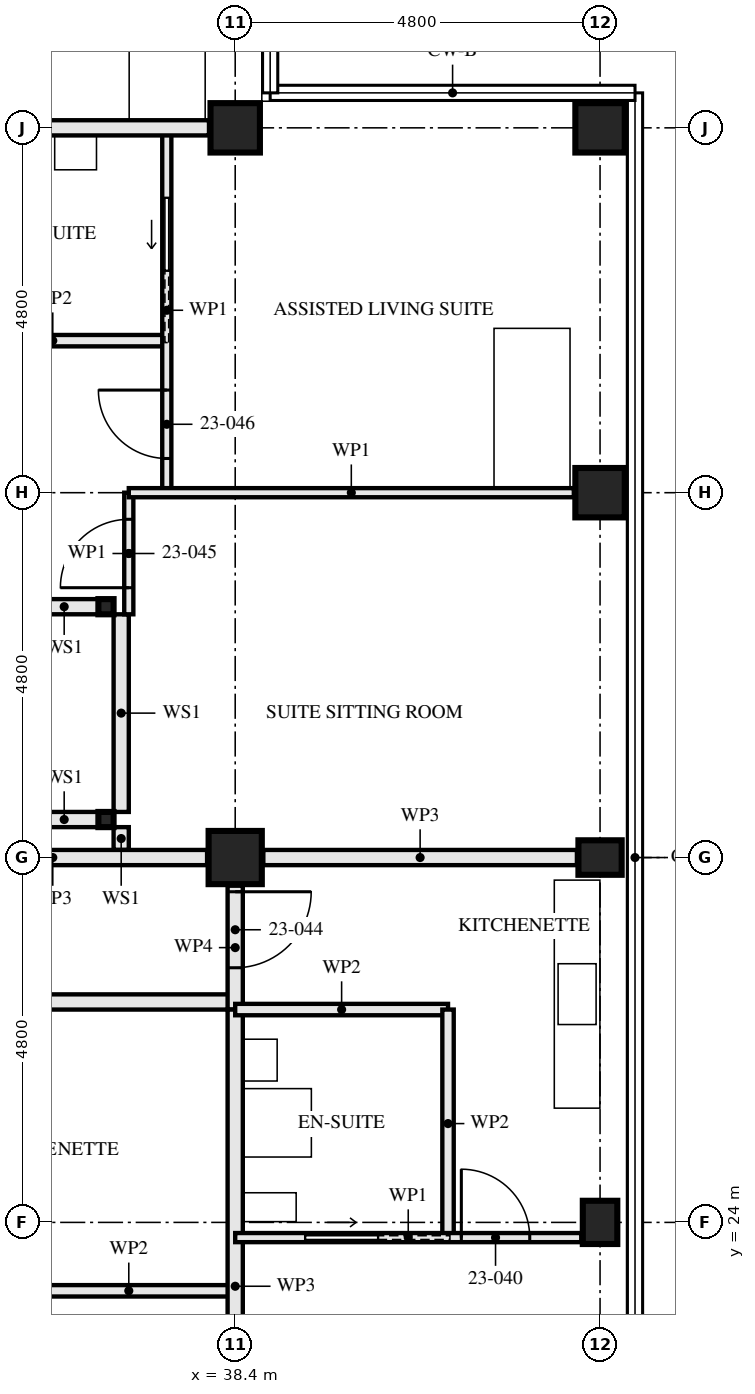
"""IFC4 building model, lengths in metres.
Left out: names, types, materials, properties, quantities, classifications, styles, units other than length and angle.
Written with IfcOpenShell. Run it as: python <this file> out.ifc"""

import sys

from ifc_helpers import new_model, si_unit, direction, frame, frame_2d, origin, origin_2d, place, context, subcontext, project, spatial, rectangle, hollow_rectangle, i_section, extrude, element, fill, save


model = new_model("IFC4")
c1 = context("Model", 3, precision=1e-05, world=origin(), true_north=direction((0.0, 1.0)))
c2 = subcontext(c1, "Body", "Model", "MODEL_VIEW")
j1 = project(units=[si_unit("LENGTHUNIT", "METRE"), si_unit("PLANEANGLEUNIT", "RADIAN")], contexts=[c1])
p1 = place(None, origin())
s1 = spatial("IfcSite", under=j1, at=p1, CompositionType="ELEMENT")
p2 = place(p1, origin())
s2 = spatial("IfcBuilding", under=s1, at=p2, CompositionType="ELEMENT")
p3 = place(p2, frame((0.0, 0.0, 87.5)))
s3 = spatial("IfcBuildingStorey", under=s2, at=p3, CompositionType="ELEMENT", Elevation=87.5)
p4 = place(p3, frame((38.4, 28.8, 0.0), z_axis=(0.0, 0.0, 1.0), x_axis=(0.0, 1.0, 0.0)))
e1 = element("IfcColumn", 1, at=p4, inside=s3, PredefinedType="COLUMN", context=c2, shape_type="SweptSolid", body=[
    extrude(hollow_rectangle(XDim=0.7, YDim=0.7, WallThickness=0.06, at=origin_2d()), origin(), (0.0, 0.0, 1.0), 3.5),
])
p5 = place(p3, frame((38.4, 38.4, 0.0), z_axis=(0.0, 0.0, 1.0), x_axis=(0.0, 1.0, 0.0)))
e2 = element("IfcColumn", 2, at=p5, inside=s3, PredefinedType="COLUMN", context=c2, shape_type="SweptSolid", body=[
    extrude(hollow_rectangle(XDim=0.65, YDim=0.65, WallThickness=0.08, at=origin_2d()), origin(), (0.0, 0.0, 1.0), 3.5),
])
for number, where, z_axis, x_axis in (
    (3, (43.2, 24.0, 0.0), (0.0, 0.0, 1.0), (1.0, 0.0, 0.0)),
    (4, (43.2, 28.8, 0.0), (0.0, 0.0, 1.0), (0.0, 1.0, 0.0)),
):
    element("IfcColumn", number, at=place(p3, frame(where, z_axis=z_axis, x_axis=x_axis)), inside=s3, PredefinedType="COLUMN", context=c2, shape_type="SweptSolid", body=[
        extrude(i_section(OverallWidth=0.454, OverallDepth=0.569, WebThickness=0.078, FlangeThickness=0.125, FilletRadius=0.015, at=origin_2d()), origin(), (0.0, 0.0, 1.0), 3.5),
    ])
for number, where, z_axis, x_axis in (
    (5, (43.2, 33.6, 0.0), (0.0, 0.0, 1.0), (1.0, 0.0, 0.0)),
    (6, (43.2, 38.4, 0.0), (0.0, 0.0, 1.0), (0.0, 1.0, 0.0)),
):
    element("IfcColumn", number, at=place(p3, frame(where, z_axis=z_axis, x_axis=x_axis)), inside=s3, PredefinedType="COLUMN", context=c2, shape_type="SweptSolid", body=[
        extrude(hollow_rectangle(XDim=0.65, YDim=0.65, WallThickness=0.08, at=origin_2d()), origin(), (0.0, 0.0, 1.0), 3.5),
    ])
for number, where, z_axis, x_axis in (
    (7, (36.7, 29.3, 0.0), (0.0, 0.0, 1.0), (1.0, 0.0, 0.0)),
    (8, (36.7, 32.1, 0.0), (0.0, 0.0, 1.0), (1.0, 0.0, 0.0)),
):
    element("IfcColumn", number, at=place(p3, frame(where, z_axis=z_axis, x_axis=x_axis)), inside=s3, PredefinedType="COLUMN", context=c2, shape_type="SweptSolid", body=[
        extrude(hollow_rectangle(XDim=0.2, YDim=0.2, WallThickness=0.008, at=origin_2d()), origin(), (0.0, 0.0, 1.0), 3.33),
    ])
p6 = place(p3, frame((35.6, 23.1, 0.0), z_axis=(0.0, 0.0, 1.0), x_axis=(1.0, 0.0, 0.0)))
e9 = element("IfcWall", 9, at=p6, inside=s3, PredefinedType="PARTITIONING", context=c2, shape_type="SweptSolid", body=[
    extrude(rectangle(XDim=2.8, YDim=0.15, at=frame_2d((1.4, 0.0))), origin(), (0.0, 0.0, 1.0), 3.33),
])
p7 = place(p3, frame((38.4, 19.52, 0.0), z_axis=(0.0, 0.0, 1.0), x_axis=(0.0, 1.0, 0.0)))
e10 = element("IfcWall", 10, at=p7, inside=s3, PredefinedType="PARTITIONING", context=c2, shape_type="SweptSolid", body=[
    extrude(rectangle(XDim=7.28, YDim=0.2, at=frame_2d((3.64, 0.0))), origin(), (0.0, 0.0, 1.0), 2.55),
])
p8 = place(p3, frame((41.2, 23.8, 0.0), z_axis=(0.0, 0.0, 1.0), x_axis=(0.0, 1.0, 0.0)))
e11 = element("IfcWall", 11, at=p8, inside=s3, PredefinedType="PARTITIONING", context=c2, shape_type="SweptSolid", body=[
    extrude(rectangle(XDim=3.0, YDim=0.15, at=frame_2d((1.5, 0.0))), origin(), (0.0, 0.0, 1.0), 2.55),
])
p9 = place(p3, frame((38.4, 26.8, 0.0), z_axis=(0.0, 0.0, 1.0), x_axis=(1.0, 0.0, 0.0)))
e12 = element("IfcWall", 12, at=p9, inside=s3, PredefinedType="PARTITIONING", context=c2, shape_type="SweptSolid", body=[
    extrude(rectangle(XDim=2.8, YDim=0.15, at=frame_2d((1.4, 0.0))), origin(), (0.0, 0.0, 1.0), 3.33),
])
p10 = place(p3, frame((38.4, 23.8, 0.0), z_axis=(0.0, 0.0, 1.0), x_axis=(1.0, 0.0, 0.0)))
e13 = element("IfcWall", 13, at=p10, inside=s3, PredefinedType="PARTITIONING", context=c2, shape_type="SweptSolid", body=[
    extrude(rectangle(XDim=4.553, YDim=0.12, at=frame_2d((2.276, 0.0))), origin(), (0.0, 0.0, 1.0), 3.33),
])
p11 = place(p10, frame((2.975, 0.0, 0.0)))
e14 = element("IfcOpeningElement", 14, at=p11, cuts=e13, PredefinedType="OPENING", context=c2, shape_type="SweptSolid", body=[
    extrude(rectangle(XDim=0.9, YDim=2.1, at=frame_2d((0.45, 1.05))), frame((0.0, 0.071, 0.0), z_axis=(0.0, -1.0, 0.0), x_axis=(1.0, 0.0, 0.0)), (0.0, 0.0, 1.0), 0.141),
])
p12 = place(p10, frame((0.925, 0.0, 0.0)))
e15 = element("IfcOpeningElement", 15, at=p12, cuts=e13, PredefinedType="OPENING", context=c2, shape_type="SweptSolid", body=[
    extrude(rectangle(XDim=0.95, YDim=2.1, at=frame_2d((0.475, 1.05))), frame((0.0, 0.071, 0.0), z_axis=(0.0, -1.0, 0.0), x_axis=(1.0, 0.0, 0.0)), (0.0, 0.0, 1.0), 0.141),
])
p13 = place(p3, frame((28.8, 26.9, 0.0), z_axis=(0.0, 0.0, 1.0), x_axis=(1.0, 0.0, 0.0)))
e16 = element("IfcWall", 16, at=p13, inside=s3, PredefinedType="PARTITIONING", context=c2, shape_type="SweptSolid", body=[
    extrude(rectangle(XDim=9.6, YDim=0.2, at=frame_2d((4.8, 0.0))), origin(), (0.0, 0.0, 1.0), 3.33),
])
p14 = place(p13, frame((0.4, 0.0, 0.0)))
e17 = element("IfcOpeningElement", 17, at=p14, cuts=e16, PredefinedType="OPENING", context=c2, shape_type="SweptSolid", body=[
    extrude(rectangle(XDim=1.0, YDim=2.1, at=frame_2d((0.5, 1.05))), frame((0.0, 0.111, 0.0), z_axis=(0.0, -1.0, 0.0), x_axis=(1.0, 0.0, 0.0)), (0.0, 0.0, 1.0), 0.221),
])
p15 = place(p13, frame((5.2, 0.0, 0.0)))
e18 = element("IfcOpeningElement", 18, at=p15, cuts=e16, PredefinedType="OPENING", context=c2, shape_type="SweptSolid", body=[
    extrude(rectangle(XDim=1.0, YDim=2.1, at=frame_2d((0.5, 1.05))), frame((0.0, 0.111, 0.0), z_axis=(0.0, -1.0, 0.0), x_axis=(1.0, 0.0, 0.0)), (0.0, 0.0, 1.0), 0.221),
])
p16 = place(p3, frame((38.4, 26.8, 0.0), z_axis=(0.0, 0.0, 1.0), x_axis=(0.0, 1.0, 0.0)))
e19 = element("IfcWall", 19, at=p16, inside=s3, PredefinedType="PARTITIONING", context=c2, shape_type="SweptSolid", body=[
    extrude(rectangle(XDim=1.63, YDim=0.2, at=frame_2d((0.815, 0.0))), origin(), (0.0, 0.0, 1.0), 3.33),
])
p17 = place(p16, frame((0.55, 0.0, 0.0)))
e20 = element("IfcOpeningElement", 20, at=p17, cuts=e19, PredefinedType="OPENING", context=c2, shape_type="SweptSolid", body=[
    extrude(rectangle(XDim=1.0, YDim=2.1, at=frame_2d((0.5, 1.05))), frame((0.0, 0.111, 0.0), z_axis=(0.0, -1.0, 0.0), x_axis=(1.0, 0.0, 0.0)), (0.0, 0.0, 1.0), 0.221),
])
for number, where, z_axis, x_axis in (
    (21, (36.6, 29.3, 0.0), (0.0, 0.0, 1.0), (-1.0, 0.0, 0.0)),
    (22, (36.6, 32.1, 0.0), (0.0, 0.0, 1.0), (-1.0, 0.0, 0.0)),
):
    element("IfcWall", number, at=place(p3, frame(where, z_axis=z_axis, x_axis=x_axis)), inside=s3, PredefinedType="SOLIDWALL", context=c2, shape_type="SweptSolid", body=[
        extrude(rectangle(XDim=0.9, YDim=0.2, at=frame_2d((0.45, 0.0))), origin(), (0.0, 0.0, 1.0), 2.99),
    ])
p18 = place(p3, frame((36.9, 28.9, 0.0), z_axis=(0.0, 0.0, 1.0), x_axis=(0.0, 1.0, 0.0)))
e23 = element("IfcWall", 23, at=p18, inside=s3, PredefinedType="SOLIDWALL", context=c2, shape_type="SweptSolid", body=[
    extrude(rectangle(XDim=0.3, YDim=0.2, at=frame_2d((0.15, 0.0))), origin(), (0.0, 0.0, 1.0), 3.33),
])
p19 = place(p3, frame((36.9, 29.4, 0.0), z_axis=(0.0, 0.0, 1.0), x_axis=(0.0, 1.0, 0.0)))
e24 = element("IfcWall", 24, at=p19, inside=s3, PredefinedType="SOLIDWALL", context=c2, shape_type="SweptSolid", body=[
    extrude(rectangle(XDim=2.6, YDim=0.2, at=frame_2d((1.3, 0.0))), origin(), (0.0, 0.0, 1.0), 3.33),
])
p20 = place(p3, frame((37.5, 35.6, 0.0), z_axis=(0.0, 0.0, 1.0), x_axis=(-1.0, 0.0, 0.0)))
e25 = element("IfcWall", 25, at=p20, inside=s3, PredefinedType="PARTITIONING", context=c2, shape_type="SweptSolid", body=[
    extrude(rectangle(XDim=3.0, YDim=0.15, at=frame_2d((1.5, 0.0))), origin(), (0.0, 0.0, 1.0), 3.33),
])
p21 = place(p3, frame((37.0, 32.0, 0.0), z_axis=(0.0, 0.0, 1.0), x_axis=(0.0, 1.0, 0.0)))
e26 = element("IfcWall", 26, at=p21, inside=s3, PredefinedType="PARTITIONING", context=c2, shape_type="SweptSolid", body=[
    extrude(rectangle(XDim=1.6, YDim=0.12, at=frame_2d((0.8, 0.0))), origin(), (0.0, 0.0, 1.0), 3.33),
])
p22 = place(p21, frame((0.35, 0.0, 0.0)))
e27 = element("IfcOpeningElement", 27, at=p22, cuts=e26, PredefinedType="OPENING", context=c2, shape_type="SweptSolid", body=[
    extrude(rectangle(XDim=0.9, YDim=2.1, at=frame_2d((0.45, 1.05))), frame((0.0, 0.071, 0.0), z_axis=(0.0, -1.0, 0.0), x_axis=(1.0, 0.0, 0.0)), (0.0, 0.0, 1.0), 0.141),
])
p23 = place(p3, frame((37.5, 33.6, 0.0), z_axis=(0.0, 0.0, 1.0), x_axis=(0.0, 1.0, 0.0)))
e28 = element("IfcWall", 28, at=p23, inside=s3, PredefinedType="PARTITIONING", context=c2, shape_type="SweptSolid", body=[
    extrude(rectangle(XDim=4.8, YDim=0.12, at=frame_2d((2.4, 0.0))), origin(), (0.0, 0.0, 1.0), 3.33),
])
p24 = place(p23, frame((0.45, 0.0, 0.0)))
e29 = element("IfcOpeningElement", 29, at=p24, cuts=e28, PredefinedType="OPENING", context=c2, shape_type="SweptSolid", body=[
    extrude(rectangle(XDim=0.9, YDim=2.1, at=frame_2d((0.45, 1.05))), frame((0.0, 0.071, 0.0), z_axis=(0.0, -1.0, 0.0), x_axis=(1.0, 0.0, 0.0)), (0.0, 0.0, 1.0), 0.141),
])
p25 = place(p23, frame((2.925, 0.0, 0.0)))
e30 = element("IfcOpeningElement", 30, at=p25, cuts=e28, PredefinedType="OPENING", context=c2, shape_type="SweptSolid", body=[
    extrude(rectangle(XDim=0.95, YDim=2.1, at=frame_2d((0.475, 1.05))), frame((0.0, 0.071, 0.0), z_axis=(0.0, -1.0, 0.0), x_axis=(1.0, 0.0, 0.0)), (0.0, 0.0, 1.0), 0.141),
])
p26 = place(p3, frame((42.855, 33.6, 0.0), z_axis=(0.0, 0.0, 1.0), x_axis=(-1.0, 0.0, 0.0)))
e31 = element("IfcWall", 31, at=p26, inside=s3, PredefinedType="PARTITIONING", context=c2, shape_type="SweptSolid", body=[
    extrude(rectangle(XDim=5.855, YDim=0.12, at=frame_2d((2.927, 0.0))), origin(), (0.0, 0.0, 1.0), 2.55),
])
p27 = place(p3, frame((38.055, 38.4, 0.0), z_axis=(0.0, 0.0, 1.0), x_axis=(-1.0, 0.0, 0.0)))
e32 = element("IfcWall", 32, at=p27, inside=s3, PredefinedType="PARTITIONING", context=c2, shape_type="SweptSolid", body=[
    extrude(rectangle(XDim=7.255, YDim=0.2, at=frame_2d((3.627, 0.0))), origin(), (0.0, 0.0, 1.0), 2.55),
])
p28 = place(p3, frame((42.896, 28.8, 0.0), z_axis=(0.0, 0.0, 1.0), x_axis=(-1.0, 0.0, 0.0)))
e33 = element("IfcWall", 33, at=p28, inside=s3, PredefinedType="PARTITIONING", context=c2, shape_type="SweptSolid", body=[
    extrude(rectangle(XDim=4.125, YDim=0.2, at=frame_2d((2.063, 0.0))), origin(), (0.0, 0.0, 1.0), 2.32),
])
p29 = place(p3, frame((38.03, 28.8, 0.0), z_axis=(0.0, 0.0, 1.0), x_axis=(-1.0, 0.0, 0.0)))
e34 = element("IfcWall", 34, at=p29, inside=s3, PredefinedType="PARTITIONING", context=c2, shape_type="SweptSolid", body=[
    extrude(rectangle(XDim=4.06, YDim=0.2, at=frame_2d((2.03, 0.0))), origin(), (0.0, 0.0, 1.0), 2.32),
])
p30 = place(p11, origin())
e35 = element("IfcDoor", 35, at=p30, inside=s3, OperationType="SINGLE_SWING_RIGHT", PredefinedType="DOOR", context=c2, shape_type="SweptSolid", body=[
    extrude(rectangle(XDim=0.9, YDim=2.1, at=frame_2d((0.45, 1.05))), frame((0.0, 0.022, 0.0), z_axis=(0.0, -1.0, 0.0), x_axis=(1.0, 0.0, 0.0)), (0.0, 0.0, 1.0), 0.044),
])
fill(e14, e35)
p31 = place(p12, origin())
e36 = element("IfcDoor", 36, at=p31, inside=s3, OperationType="SLIDING_TO_LEFT", PredefinedType="DOOR", context=c2, shape_type="SweptSolid", body=[
    extrude(rectangle(XDim=0.95, YDim=2.1, at=frame_2d((0.475, 1.05))), frame((0.0, 0.022, 0.0), z_axis=(0.0, -1.0, 0.0), x_axis=(1.0, 0.0, 0.0)), (0.0, 0.0, 1.0), 0.044),
])
fill(e15, e36)
p32 = place(p17, frame((1.0, 0.0, 0.0), z_axis=(0.0, 0.0, 1.0), x_axis=(-1.0, 0.0, 0.0)))
e37 = element("IfcDoor", 37, at=p32, inside=s3, OperationType="SINGLE_SWING_RIGHT", PredefinedType="DOOR", context=c2, shape_type="SweptSolid", body=[
    extrude(rectangle(XDim=1.0, YDim=2.1, at=frame_2d((0.5, 1.05))), frame((0.0, 0.027, 0.0), z_axis=(0.0, -1.0, 0.0), x_axis=(1.0, 0.0, 0.0)), (0.0, 0.0, 1.0), 0.054),
])
fill(e20, e37)
p33 = place(p22, origin())
e38 = element("IfcDoor", 38, at=p33, inside=s3, OperationType="SINGLE_SWING_RIGHT", PredefinedType="DOOR", context=c2, shape_type="SweptSolid", body=[
    extrude(rectangle(XDim=0.9, YDim=2.1, at=frame_2d((0.45, 1.05))), frame((0.0, 0.022, 0.0), z_axis=(0.0, -1.0, 0.0), x_axis=(1.0, 0.0, 0.0)), (0.0, 0.0, 1.0), 0.044),
])
fill(e27, e38)
p34 = place(p24, origin())
e39 = element("IfcDoor", 39, at=p34, inside=s3, OperationType="SINGLE_SWING_LEFT", PredefinedType="DOOR", context=c2, shape_type="SweptSolid", body=[
    extrude(rectangle(XDim=0.9, YDim=2.1, at=frame_2d((0.45, 1.05))), frame((0.0, 0.022, 0.0), z_axis=(0.0, -1.0, 0.0), x_axis=(1.0, 0.0, 0.0)), (0.0, 0.0, 1.0), 0.044),
])
fill(e29, e39)
p35 = place(p25, origin())
e40 = element("IfcDoor", 40, at=p35, inside=s3, OperationType="SLIDING_TO_RIGHT", PredefinedType="DOOR", context=c2, shape_type="SweptSolid", body=[
    extrude(rectangle(XDim=0.95, YDim=2.1, at=frame_2d((0.475, 1.05))), frame((0.0, 0.022, 0.0), z_axis=(0.0, -1.0, 0.0), x_axis=(1.0, 0.0, 0.0)), (0.0, 0.0, 1.0), 0.044),
])
fill(e30, e40)
save(model, sys.argv[1])
